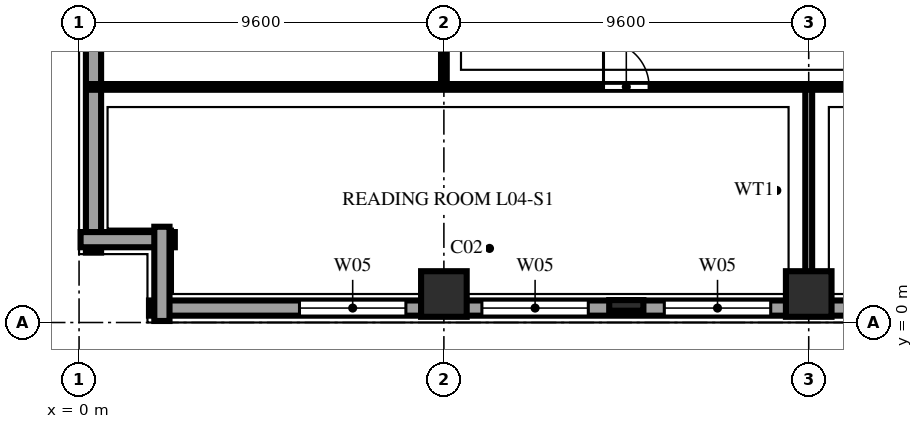
"""IFC4 building model, lengths in metres.
Left out: names, types, materials, properties, quantities, classifications, styles, units other than length and angle.
Written with IfcOpenShell. Run it as: python <this file> out.ifc"""

import sys

from ifc_helpers import new_model, si_unit, direction, frame, frame_2d, origin, origin_2d, place, context, subcontext, project, spatial, rectangle, extrude, element, fill, save


model = new_model("IFC4")
c1 = context("Model", 3, precision=1e-05, world=origin(), true_north=direction((0.0, 1.0)))
c2 = subcontext(c1, "Body", "Model", "MODEL_VIEW")
j1 = project(units=[si_unit("LENGTHUNIT", "METRE"), si_unit("PLANEANGLEUNIT", "RADIAN")], contexts=[c1])
p1 = place(None, origin())
s1 = spatial("IfcSite", under=j1, at=p1, CompositionType="ELEMENT")
p2 = place(p1, origin())
s2 = spatial("IfcBuilding", under=s1, at=p2, CompositionType="ELEMENT")
p3 = place(p2, frame((0.0, 0.0, 19.6)))
s3 = spatial("IfcBuildingStorey", under=s2, at=p3, CompositionType="ELEMENT", Elevation=19.6)
for number, where, z_axis, x_axis in (
    (1, (9.6, 0.75, 0.0), (0.0, 0.0, 1.0), (1.0, 0.0, 0.0)),
    (2, (19.2, 0.75, 0.0), (0.0, 0.0, 1.0), (1.0, 0.0, 0.0)),
):
    element("IfcColumn", number, at=place(p3, frame(where, z_axis=z_axis, x_axis=x_axis)), inside=s3, PredefinedType="COLUMN", context=c2, shape_type="SweptSolid", body=[
        extrude(rectangle(XDim=1.2, YDim=1.2, at=origin_2d()), origin(), (0.0, 0.0, 1.0), 4.6),
    ])
p4 = place(p3, frame((14.4, 0.45, 0.0), z_axis=(0.0, 0.0, 1.0), x_axis=(1.0, 0.0, 0.0)))
e3 = element("IfcColumn", 3, at=p4, inside=s3, PredefinedType="PILASTER", context=c2, shape_type="SweptSolid", body=[
    extrude(rectangle(XDim=0.9, YDim=0.28, at=origin_2d()), origin(), (0.0, 0.0, 1.0), 4.6),
])
p5 = place(p3, frame((1.84, 0.38, 0.0), z_axis=(0.0, 0.0, 1.0), x_axis=(1.0, 0.0, 0.0)))
e4 = element("IfcWall", 4, at=p5, inside=s3, PredefinedType="SOLIDWALL", context=c2, shape_type="SweptSolid", body=[
    extrude(rectangle(XDim=63.52, YDim=0.4, at=frame_2d((31.76, 0.0))), origin(), (0.0, 0.0, 1.0), 4.34),
])
p6 = place(p5, frame((3.96, 0.0, 0.75)))
e5 = element("IfcOpeningElement", 5, at=p6, cuts=e4, PredefinedType="OPENING", context=c2, shape_type="SweptSolid", body=[
    extrude(rectangle(XDim=2.8, YDim=2.3, at=frame_2d((1.4, 1.15))), frame((0.0, 0.212, 0.0), z_axis=(0.0, -1.0, 0.0), x_axis=(1.0, 0.0, 0.0)), (0.0, 0.0, 1.0), 0.424),
])
p7 = place(p5, frame((8.76, 0.0, 0.75)))
e6 = element("IfcOpeningElement", 6, at=p7, cuts=e4, PredefinedType="OPENING", context=c2, shape_type="SweptSolid", body=[
    extrude(rectangle(XDim=2.8, YDim=2.3, at=frame_2d((1.4, 1.15))), frame((0.0, 0.212, 0.0), z_axis=(0.0, -1.0, 0.0), x_axis=(1.0, 0.0, 0.0)), (0.0, 0.0, 1.0), 0.424),
])
p8 = place(p5, frame((13.56, 0.0, 0.75)))
e7 = element("IfcOpeningElement", 7, at=p8, cuts=e4, PredefinedType="OPENING", context=c2, shape_type="SweptSolid", body=[
    extrude(rectangle(XDim=2.8, YDim=2.3, at=frame_2d((1.4, 1.15))), frame((0.0, 0.212, 0.0), z_axis=(0.0, -1.0, 0.0), x_axis=(1.0, 0.0, 0.0)), (0.0, 0.0, 1.0), 0.424),
])
p9 = place(p5, frame((18.36, 0.0, 0.75)))
e8 = element("IfcOpeningElement", 8, at=p9, cuts=e4, PredefinedType="OPENING", context=c2, shape_type="SweptSolid", body=[
    extrude(rectangle(XDim=2.8, YDim=2.3, at=frame_2d((1.4, 1.15))), frame((0.0, 0.212, 0.0), z_axis=(0.0, -1.0, 0.0), x_axis=(1.0, 0.0, 0.0)), (0.0, 0.0, 1.0), 0.424),
])
p10 = place(p5, frame((23.16, 0.0, 0.75)))
e9 = element("IfcOpeningElement", 9, at=p10, cuts=e4, PredefinedType="OPENING", context=c2, shape_type="SweptSolid", body=[
    extrude(rectangle(XDim=2.8, YDim=2.3, at=frame_2d((1.4, 1.15))), frame((0.0, 0.212, 0.0), z_axis=(0.0, -1.0, 0.0), x_axis=(1.0, 0.0, 0.0)), (0.0, 0.0, 1.0), 0.424),
])
p11 = place(p5, frame((27.96, 0.0, 0.75)))
e10 = element("IfcOpeningElement", 10, at=p11, cuts=e4, PredefinedType="OPENING", context=c2, shape_type="SweptSolid", body=[
    extrude(rectangle(XDim=2.8, YDim=2.3, at=frame_2d((1.4, 1.15))), frame((0.0, 0.212, 0.0), z_axis=(0.0, -1.0, 0.0), x_axis=(1.0, 0.0, 0.0)), (0.0, 0.0, 1.0), 0.424),
])
p12 = place(p3, frame((0.38, 65.36, 0.0), z_axis=(0.0, 0.0, 1.0), x_axis=(0.0, -1.0, 0.0)))
e11 = element("IfcWall", 11, at=p12, inside=s3, PredefinedType="SOLIDWALL", context=c2, shape_type="SweptSolid", body=[
    extrude(rectangle(XDim=63.52, YDim=0.4, at=frame_2d((31.76, 0.0))), origin(), (0.0, 0.0, 1.0), 4.34),
])
p13 = place(p12, frame((32.76, 0.0, 0.75)))
e12 = element("IfcOpeningElement", 12, at=p13, cuts=e11, PredefinedType="OPENING", context=c2, shape_type="SweptSolid", body=[
    extrude(rectangle(XDim=2.8, YDim=2.3, at=frame_2d((1.4, 1.15))), frame((0.0, 0.212, 0.0), z_axis=(0.0, -1.0, 0.0), x_axis=(1.0, 0.0, 0.0)), (0.0, 0.0, 1.0), 0.424),
])
p14 = place(p12, frame((37.56, 0.0, 0.75)))
e13 = element("IfcOpeningElement", 13, at=p14, cuts=e11, PredefinedType="OPENING", context=c2, shape_type="SweptSolid", body=[
    extrude(rectangle(XDim=2.8, YDim=2.3, at=frame_2d((1.4, 1.15))), frame((0.0, 0.212, 0.0), z_axis=(0.0, -1.0, 0.0), x_axis=(1.0, 0.0, 0.0)), (0.0, 0.0, 1.0), 0.424),
])
p15 = place(p12, frame((42.36, 0.0, 0.75)))
e14 = element("IfcOpeningElement", 14, at=p15, cuts=e11, PredefinedType="OPENING", context=c2, shape_type="SweptSolid", body=[
    extrude(rectangle(XDim=2.8, YDim=2.3, at=frame_2d((1.4, 1.15))), frame((0.0, 0.212, 0.0), z_axis=(0.0, -1.0, 0.0), x_axis=(1.0, 0.0, 0.0)), (0.0, 0.0, 1.0), 0.424),
])
p16 = place(p12, frame((47.16, 0.0, 0.75)))
e15 = element("IfcOpeningElement", 15, at=p16, cuts=e11, PredefinedType="OPENING", context=c2, shape_type="SweptSolid", body=[
    extrude(rectangle(XDim=2.8, YDim=2.3, at=frame_2d((1.4, 1.15))), frame((0.0, 0.212, 0.0), z_axis=(0.0, -1.0, 0.0), x_axis=(1.0, 0.0, 0.0)), (0.0, 0.0, 1.0), 0.424),
])
p17 = place(p12, frame((51.96, 0.0, 0.75)))
e16 = element("IfcOpeningElement", 16, at=p17, cuts=e11, PredefinedType="OPENING", context=c2, shape_type="SweptSolid", body=[
    extrude(rectangle(XDim=2.8, YDim=2.3, at=frame_2d((1.4, 1.15))), frame((0.0, 0.212, 0.0), z_axis=(0.0, -1.0, 0.0), x_axis=(1.0, 0.0, 0.0)), (0.0, 0.0, 1.0), 0.424),
])
for number, where, z_axis, x_axis in (
    (17, (0.04, 2.18, 0.0), (0.0, 0.0, 1.0), (1.0, 0.0, 0.0)),
    (18, (2.18, 2.52, 0.0), (0.0, 0.0, 1.0), (0.0, -1.0, 0.0)),
):
    element("IfcWall", number, at=place(p3, frame(where, z_axis=z_axis, x_axis=x_axis)), inside=s3, PredefinedType="SOLIDWALL", context=c2, shape_type="SweptSolid", body=[
        extrude(rectangle(XDim=2.48, YDim=0.4, at=frame_2d((1.24, 0.0))), origin(), (0.0, 0.0, 1.0), 4.34),
    ])
p18 = place(p3, frame((9.6, 6.2, 0.0), z_axis=(0.0, 0.0, 1.0), x_axis=(0.0, 1.0, 0.0)))
e19 = element("IfcWall", 19, at=p18, inside=s3, PredefinedType="PARTITIONING", context=c2, shape_type="SweptSolid", body=[
    extrude(rectangle(XDim=3.4, YDim=0.15, at=frame_2d((1.7, 0.0))), origin(), (0.0, 0.0, 1.0), 3.724),
])
p19 = place(p3, frame((19.2, 0.22, 0.0), z_axis=(0.0, 0.0, 1.0), x_axis=(0.0, 1.0, 0.0)))
e20 = element("IfcWall", 20, at=p19, inside=s3, PredefinedType="PARTITIONING", context=c2, shape_type="SweptSolid", body=[
    extrude(rectangle(XDim=0.53, YDim=0.18, at=frame_2d((0.265, 0.0))), origin(), (0.0, 0.0, 1.0), 4.34),
])
p20 = place(p3, frame((19.2, 0.75, 0.0), z_axis=(0.0, 0.0, 1.0), x_axis=(0.0, 1.0, 0.0)))
e21 = element("IfcWall", 21, at=p20, inside=s3, PredefinedType="PARTITIONING", context=c2, shape_type="SweptSolid", body=[
    extrude(rectangle(XDim=5.45, YDim=0.18, at=frame_2d((2.725, 0.0))), origin(), (0.0, 0.0, 1.0), 3.724),
])
p21 = place(p3, frame((0.22, 6.2, 0.0), z_axis=(0.0, 0.0, 1.0), x_axis=(1.0, 0.0, 0.0)))
e22 = element("IfcWall", 22, at=p21, inside=s3, PredefinedType="PARTITIONING", context=c2, shape_type="SweptSolid", body=[
    extrude(rectangle(XDim=52.58, YDim=0.15, at=frame_2d((26.29, 0.0))), origin(), (0.0, 0.0, 1.0), 4.34),
])
p22 = place(p21, frame((13.58, 0.0, 0.0)))
e23 = element("IfcOpeningElement", 23, at=p22, cuts=e22, PredefinedType="OPENING", context=c2, shape_type="SweptSolid", body=[
    extrude(rectangle(XDim=1.2, YDim=2.2, at=frame_2d((0.6, 1.1))), frame((0.0, 0.087, 0.0), z_axis=(0.0, -1.0, 0.0), x_axis=(1.0, 0.0, 0.0)), (0.0, 0.0, 1.0), 0.174),
])
p23 = place(p21, frame((23.28, 0.0, 0.0)))
e24 = element("IfcOpeningElement", 24, at=p23, cuts=e22, PredefinedType="OPENING", context=c2, shape_type="SweptSolid", body=[
    extrude(rectangle(XDim=1.2, YDim=2.2, at=frame_2d((0.6, 1.1))), frame((0.0, 0.087, 0.0), z_axis=(0.0, -1.0, 0.0), x_axis=(1.0, 0.0, 0.0)), (0.0, 0.0, 1.0), 0.174),
])
p24 = place(p21, frame((41.18, 0.0, 0.0)))
e25 = element("IfcOpeningElement", 25, at=p24, cuts=e22, PredefinedType="OPENING", context=c2, shape_type="SweptSolid", body=[
    extrude(rectangle(XDim=2.0, YDim=2.3, at=frame_2d((1.0, 1.15))), frame((0.0, 0.087, 0.0), z_axis=(0.0, -1.0, 0.0), x_axis=(1.0, 0.0, 0.0)), (0.0, 0.0, 1.0), 0.174),
])
p25 = place(p6, origin())
e26 = element("IfcWindow", 26, at=p25, inside=s3, PartitioningType="TRIPLE_PANEL_VERTICAL", PredefinedType="WINDOW", context=c2, shape_type="SweptSolid", body=[
    extrude(rectangle(XDim=2.8, YDim=2.3, at=frame_2d((1.4, 1.15))), frame((0.0, 0.11, 0.0), z_axis=(0.0, -1.0, 0.0), x_axis=(1.0, 0.0, 0.0)), (0.0, 0.0, 1.0), 0.06),
])
fill(e5, e26)
p26 = place(p7, origin())
e27 = element("IfcWindow", 27, at=p26, inside=s3, PartitioningType="TRIPLE_PANEL_VERTICAL", PredefinedType="WINDOW", context=c2, shape_type="SweptSolid", body=[
    extrude(rectangle(XDim=2.8, YDim=2.3, at=frame_2d((1.4, 1.15))), frame((0.0, 0.11, 0.0), z_axis=(0.0, -1.0, 0.0), x_axis=(1.0, 0.0, 0.0)), (0.0, 0.0, 1.0), 0.06),
])
fill(e6, e27)
p27 = place(p8, origin())
e28 = element("IfcWindow", 28, at=p27, inside=s3, PartitioningType="TRIPLE_PANEL_VERTICAL", PredefinedType="WINDOW", context=c2, shape_type="SweptSolid", body=[
    extrude(rectangle(XDim=2.8, YDim=2.3, at=frame_2d((1.4, 1.15))), frame((0.0, 0.11, 0.0), z_axis=(0.0, -1.0, 0.0), x_axis=(1.0, 0.0, 0.0)), (0.0, 0.0, 1.0), 0.06),
])
fill(e7, e28)
p28 = place(p22, origin())
e29 = element("IfcDoor", 29, at=p28, inside=s3, OperationType="SINGLE_SWING_LEFT", PredefinedType="DOOR", context=c2, shape_type="SweptSolid", body=[
    extrude(rectangle(XDim=1.2, YDim=2.2, at=frame_2d((0.6, 1.1))), frame((0.0, 0.025, 0.0), z_axis=(0.0, -1.0, 0.0), x_axis=(1.0, 0.0, 0.0)), (0.0, 0.0, 1.0), 0.05),
])
fill(e23, e29)
save(model, sys.argv[1])
